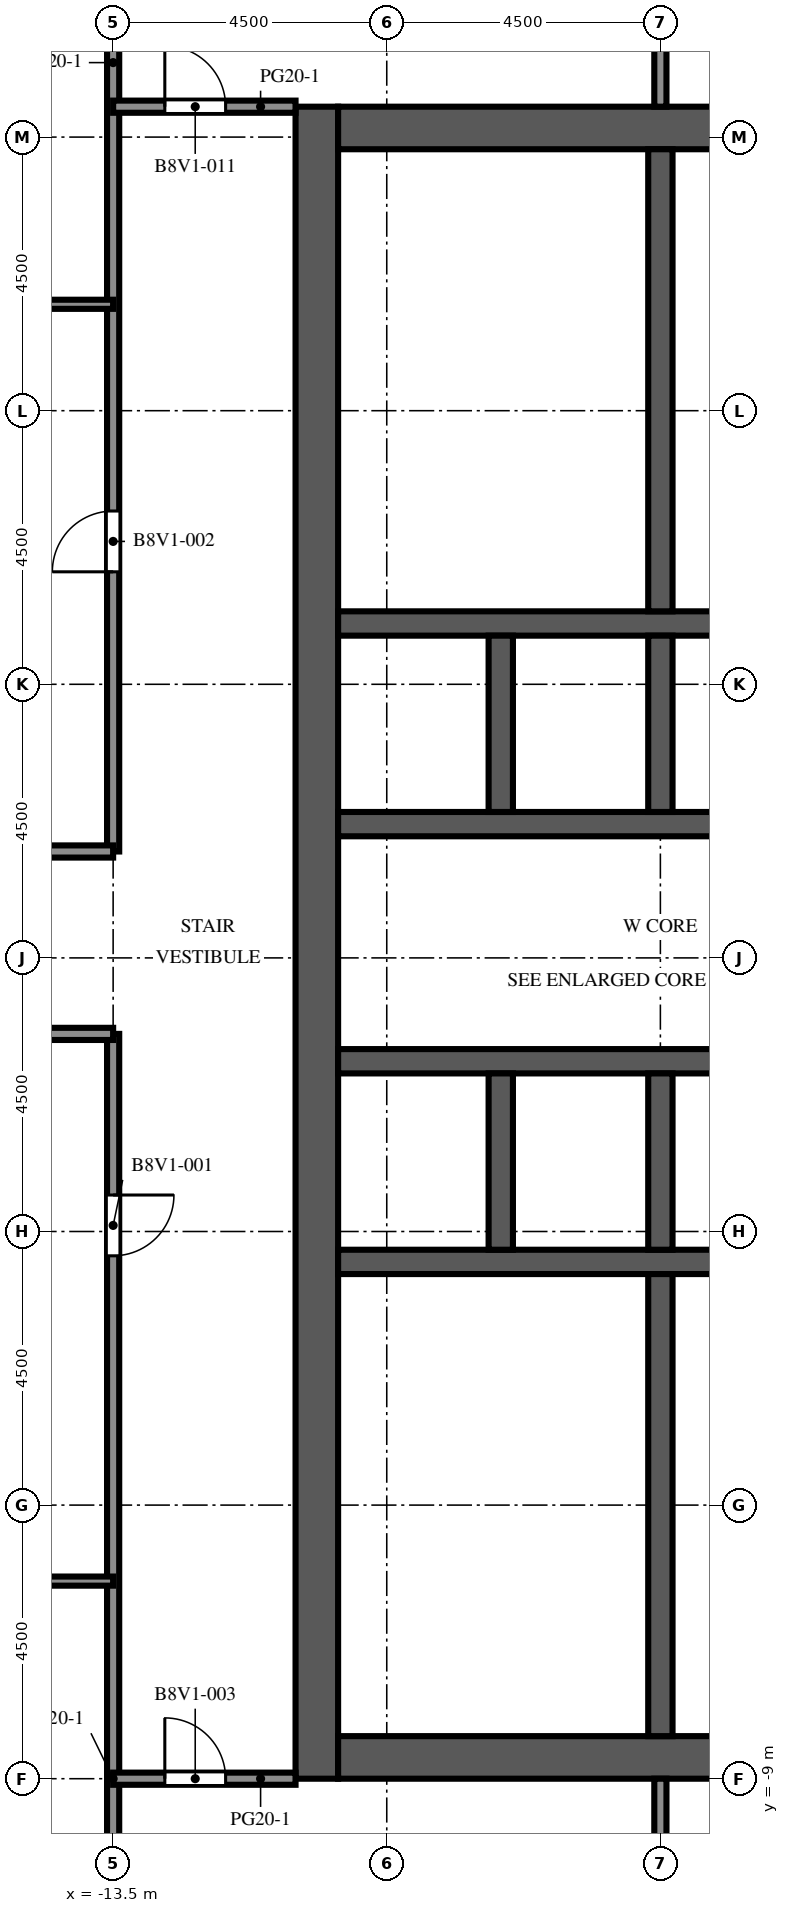
"""IFC4 building model, lengths in metres.
Left out: names, types, materials, properties, quantities, classifications, styles, units other than length and angle.
Written with IfcOpenShell. Run it as: python <this file> out.ifc"""

import sys

from ifc_helpers import new_model, si_unit, direction, frame, frame_2d, origin, place, context, subcontext, project, spatial, rectangle, extrude, element, fill, save


model = new_model("IFC4")
c1 = context("Model", 3, precision=1e-05, world=origin(), true_north=direction((0.0, 1.0)))
c2 = subcontext(c1, "Body", "Model", "MODEL_VIEW")
j1 = project(units=[si_unit("LENGTHUNIT", "METRE"), si_unit("PLANEANGLEUNIT", "RADIAN")], contexts=[c1])
p1 = place(None, origin())
s1 = spatial("IfcSite", under=j1, at=p1, CompositionType="ELEMENT")
p2 = place(p1, origin())
s2 = spatial("IfcBuilding", under=s1, at=p2, CompositionType="ELEMENT")
p3 = place(p2, frame((0.0, 0.0, 270.4)))
s3 = spatial("IfcBuildingStorey", under=s2, at=p3, CompositionType="ELEMENT", Elevation=270.4)
p4 = place(p3, frame((-10.15, -9.0, 0.0), z_axis=(0.0, 0.0, 1.0), x_axis=(0.0, 1.0, 0.0)))
e1 = element("IfcWall", 1, at=p4, inside=s3, PredefinedType="SHEAR", context=c2, shape_type="SweptSolid", body=[
    extrude(rectangle(XDim=27.5, YDim=0.7, at=frame_2d((13.75, 0.0))), origin(), (0.0, 0.0, 1.0), 4.1),
])
p5 = place(p4, frame((12.55, 0.0, 0.0)))
e2 = element("IfcOpeningElement", 2, at=p5, cuts=e1, PredefinedType="OPENING", context=c2, shape_type="SweptSolid", body=[
    extrude(rectangle(XDim=2.4, YDim=2.4, at=frame_2d((1.2, 1.2))), frame((0.0, 0.36, 0.0), z_axis=(0.0, -1.0, 0.0), x_axis=(1.0, 0.0, 0.0)), (0.0, 0.0, 1.0), 0.72),
])
p6 = place(p4, frame((6.825, 0.0, 0.0)))
e3 = element("IfcOpeningElement", 3, at=p6, cuts=e1, PredefinedType="OPENING", context=c2, shape_type="SweptSolid", body=[
    extrude(rectangle(XDim=1.2, YDim=2.1, at=frame_2d((0.6, 1.05))), frame((0.0, 0.36, 0.0), z_axis=(0.0, -1.0, 0.0), x_axis=(1.0, 0.0, 0.0)), (0.0, 0.0, 1.0), 0.72),
])
p7 = place(p4, frame((19.475, 0.0, 0.0)))
e4 = element("IfcOpeningElement", 4, at=p7, cuts=e1, PredefinedType="OPENING", context=c2, shape_type="SweptSolid", body=[
    extrude(rectangle(XDim=1.2, YDim=2.1, at=frame_2d((0.6, 1.05))), frame((0.0, 0.36, 0.0), z_axis=(0.0, -1.0, 0.0), x_axis=(1.0, 0.0, 0.0)), (0.0, 0.0, 1.0), 0.72),
])
for number, where, z_axis, x_axis in (
    (5, (-9.8, -8.65, 0.0), (0.0, 0.0, 1.0), (1.0, 0.0, 0.0)),
    (6, (-9.8, 18.15, 0.0), (0.0, 0.0, 1.0), (1.0, 0.0, 0.0)),
):
    element("IfcWall", number, at=place(p3, frame(where, z_axis=z_axis, x_axis=x_axis)), inside=s3, PredefinedType="SHEAR", context=c2, shape_type="SweptSolid", body=[
        extrude(rectangle(XDim=10.6, YDim=0.7, at=frame_2d((5.3, 0.0))), origin(), (0.0, 0.0, 1.0), 4.1),
    ])
p8 = place(p3, frame((-9.8, -0.5, 0.0), z_axis=(0.0, 0.0, 1.0), x_axis=(1.0, 0.0, 0.0)))
e7 = element("IfcWall", 7, at=p8, inside=s3, PredefinedType="SHEAR", context=c2, shape_type="SweptSolid", body=[
    extrude(rectangle(XDim=10.6, YDim=0.4, at=frame_2d((5.3, 0.0))), origin(), (0.0, 0.0, 1.0), 4.1),
])
p9 = place(p3, frame((-9.8, 2.8, 0.0), z_axis=(0.0, 0.0, 1.0), x_axis=(1.0, 0.0, 0.0)))
e8 = element("IfcWall", 8, at=p9, inside=s3, PredefinedType="SHEAR", context=c2, shape_type="SweptSolid", body=[
    extrude(rectangle(XDim=10.6, YDim=0.4, at=frame_2d((5.3, 0.0))), origin(), (0.0, 0.0, 1.0), 4.1),
])
p10 = place(p9, frame((0.688, 0.0, 0.0)))
e9 = element("IfcOpeningElement", 9, at=p10, cuts=e8, PredefinedType="OPENING", context=c2, shape_type="SweptSolid", body=[
    extrude(rectangle(XDim=1.1, YDim=2.1, at=frame_2d((0.55, 1.05))), frame((0.0, 0.21, 0.0), z_axis=(0.0, -1.0, 0.0), x_axis=(1.0, 0.0, 0.0)), (0.0, 0.0, 1.0), 0.42),
])
p11 = place(p9, frame((3.438, 0.0, 0.0)))
e10 = element("IfcOpeningElement", 10, at=p11, cuts=e8, PredefinedType="OPENING", context=c2, shape_type="SweptSolid", body=[
    extrude(rectangle(XDim=1.1, YDim=2.1, at=frame_2d((0.55, 1.05))), frame((0.0, 0.21, 0.0), z_axis=(0.0, -1.0, 0.0), x_axis=(1.0, 0.0, 0.0)), (0.0, 0.0, 1.0), 0.42),
])
p12 = place(p9, frame((6.113, 0.0, 0.0)))
e11 = element("IfcOpeningElement", 11, at=p12, cuts=e8, PredefinedType="OPENING", context=c2, shape_type="SweptSolid", body=[
    extrude(rectangle(XDim=1.0, YDim=2.1, at=frame_2d((0.5, 1.05))), frame((0.0, 0.21, 0.0), z_axis=(0.0, -1.0, 0.0), x_axis=(1.0, 0.0, 0.0)), (0.0, 0.0, 1.0), 0.42),
])
p13 = place(p9, frame((8.863, 0.0, 0.0)))
e12 = element("IfcOpeningElement", 12, at=p13, cuts=e8, PredefinedType="OPENING", context=c2, shape_type="SweptSolid", body=[
    extrude(rectangle(XDim=1.0, YDim=2.1, at=frame_2d((0.5, 1.05))), frame((0.0, 0.21, 0.0), z_axis=(0.0, -1.0, 0.0), x_axis=(1.0, 0.0, 0.0)), (0.0, 0.0, 1.0), 0.42),
])
p14 = place(p3, frame((-9.8, 6.7, 0.0), z_axis=(0.0, 0.0, 1.0), x_axis=(1.0, 0.0, 0.0)))
e13 = element("IfcWall", 13, at=p14, inside=s3, PredefinedType="SHEAR", context=c2, shape_type="SweptSolid", body=[
    extrude(rectangle(XDim=10.6, YDim=0.4, at=frame_2d((5.3, 0.0))), origin(), (0.0, 0.0, 1.0), 4.1),
])
p15 = place(p14, frame((3.438, 0.0, 0.0)))
e14 = element("IfcOpeningElement", 14, at=p15, cuts=e13, PredefinedType="OPENING", context=c2, shape_type="SweptSolid", body=[
    extrude(rectangle(XDim=1.1, YDim=2.1, at=frame_2d((0.55, 1.05))), frame((0.0, 0.21, 0.0), z_axis=(0.0, -1.0, 0.0), x_axis=(1.0, 0.0, 0.0)), (0.0, 0.0, 1.0), 0.42),
])
p16 = place(p14, frame((6.062, 0.0, 0.0)))
e15 = element("IfcOpeningElement", 15, at=p16, cuts=e13, PredefinedType="OPENING", context=c2, shape_type="SweptSolid", body=[
    extrude(rectangle(XDim=1.1, YDim=2.1, at=frame_2d((0.55, 1.05))), frame((0.0, 0.21, 0.0), z_axis=(0.0, -1.0, 0.0), x_axis=(1.0, 0.0, 0.0)), (0.0, 0.0, 1.0), 0.42),
])
p17 = place(p14, frame((8.812, 0.0, 0.0)))
e16 = element("IfcOpeningElement", 16, at=p17, cuts=e13, PredefinedType="OPENING", context=c2, shape_type="SweptSolid", body=[
    extrude(rectangle(XDim=1.1, YDim=2.1, at=frame_2d((0.55, 1.05))), frame((0.0, 0.21, 0.0), z_axis=(0.0, -1.0, 0.0), x_axis=(1.0, 0.0, 0.0)), (0.0, 0.0, 1.0), 0.42),
])
p18 = place(p14, frame((0.738, 0.0, 0.0)))
e17 = element("IfcOpeningElement", 17, at=p18, cuts=e13, PredefinedType="OPENING", context=c2, shape_type="SweptSolid", body=[
    extrude(rectangle(XDim=1.0, YDim=2.1, at=frame_2d((0.5, 1.05))), frame((0.0, 0.21, 0.0), z_axis=(0.0, -1.0, 0.0), x_axis=(1.0, 0.0, 0.0)), (0.0, 0.0, 1.0), 0.42),
])
p19 = place(p3, frame((-9.8, 10.0, 0.0), z_axis=(0.0, 0.0, 1.0), x_axis=(1.0, 0.0, 0.0)))
e18 = element("IfcWall", 18, at=p19, inside=s3, PredefinedType="SHEAR", context=c2, shape_type="SweptSolid", body=[
    extrude(rectangle(XDim=10.6, YDim=0.4, at=frame_2d((5.3, 0.0))), origin(), (0.0, 0.0, 1.0), 4.1),
])
for number, where, z_axis, x_axis in (
    (19, (-7.125, -0.3, 0.0), (0.0, 0.0, 1.0), (0.0, 1.0, 0.0)),
    (20, (-7.125, 6.9, 0.0), (0.0, 0.0, 1.0), (0.0, 1.0, 0.0)),
    (21, (-4.5, -0.3, 0.0), (0.0, 0.0, 1.0), (0.0, 1.0, 0.0)),
    (22, (-4.5, 6.9, 0.0), (0.0, 0.0, 1.0), (0.0, 1.0, 0.0)),
):
    element("IfcWall", number, at=place(p3, frame(where, z_axis=z_axis, x_axis=x_axis)), inside=s3, PredefinedType="SHEAR", context=c2, shape_type="SweptSolid", body=[
        extrude(rectangle(XDim=2.9, YDim=0.4, at=frame_2d((1.45, 0.0))), origin(), (0.0, 0.0, 1.0), 4.1),
    ])
for number, where, z_axis, x_axis in (
    (23, (-4.5, -8.3, 0.0), (0.0, 0.0, 1.0), (0.0, 1.0, 0.0)),
    (24, (-4.5, 10.2, 0.0), (0.0, 0.0, 1.0), (0.0, 1.0, 0.0)),
):
    element("IfcWall", number, at=place(p3, frame(where, z_axis=z_axis, x_axis=x_axis)), inside=s3, PredefinedType="SHEAR", context=c2, shape_type="SweptSolid", body=[
        extrude(rectangle(XDim=7.6, YDim=0.4, at=frame_2d((3.8, 0.0))), origin(), (0.0, 0.0, 1.0), 4.1),
    ])
for number, where, z_axis, x_axis in (
    (25, (-4.3, -6.02, 0.0), (0.0, 0.0, 1.0), (1.0, 0.0, 0.0)),
    (26, (-4.3, -2.98, 0.0), (0.0, 0.0, 1.0), (1.0, 0.0, 0.0)),
):
    element("IfcWall", number, at=place(p3, frame(where, z_axis=z_axis, x_axis=x_axis)), inside=s3, PredefinedType="PARTITIONING", context=c2, shape_type="SweptSolid", body=[
        extrude(rectangle(XDim=3.5, YDim=0.1, at=frame_2d((1.75, 0.0))), origin(), (0.0, 0.0, 1.0), 3.65),
    ])
for number, where, z_axis, x_axis in (
    (27, (-4.3, 11.72, 0.0), (0.0, 0.0, 1.0), (1.0, 0.0, 0.0)),
    (28, (-4.3, 13.62, 0.0), (0.0, 0.0, 1.0), (1.0, 0.0, 0.0)),
    (29, (-4.3, 15.9, 0.0), (0.0, 0.0, 1.0), (1.0, 0.0, 0.0)),
):
    element("IfcWall", number, at=place(p3, frame(where, z_axis=z_axis, x_axis=x_axis)), inside=s3, PredefinedType="PARTITIONING", context=c2, shape_type="SweptSolid", body=[
        extrude(rectangle(XDim=5.1, YDim=0.1, at=frame_2d((2.55, 0.0))), origin(), (0.0, 0.0, 1.0), 3.65),
    ])
p20 = place(p3, frame((-13.5, -17.6, 0.0), z_axis=(0.0, 0.0, 1.0), x_axis=(0.0, 1.0, 0.0)))
e30 = element("IfcWall", 30, at=p20, inside=s3, PredefinedType="PARTITIONING", context=c2, shape_type="SweptSolid", body=[
    extrude(rectangle(XDim=20.85, YDim=0.2, at=frame_2d((10.425, 0.0))), origin(), (0.0, 0.0, 1.0), 3.65),
])
p21 = place(p20, frame((17.2, 0.0, 0.0)))
e31 = element("IfcOpeningElement", 31, at=p21, cuts=e30, PredefinedType="OPENING", context=c2, shape_type="SweptSolid", body=[
    extrude(rectangle(XDim=1.0, YDim=2.1, at=frame_2d((0.5, 1.05))), frame((0.0, 0.11, 0.0), z_axis=(0.0, -1.0, 0.0), x_axis=(1.0, 0.0, 0.0)), (0.0, 0.0, 1.0), 0.22),
])
p22 = place(p3, frame((-13.5, 6.25, 0.0), z_axis=(0.0, 0.0, 1.0), x_axis=(0.0, 1.0, 0.0)))
e32 = element("IfcWall", 32, at=p22, inside=s3, PredefinedType="PARTITIONING", context=c2, shape_type="SweptSolid", body=[
    extrude(rectangle(XDim=20.35, YDim=0.2, at=frame_2d((10.175, 0.0))), origin(), (0.0, 0.0, 1.0), 3.65),
])
p23 = place(p22, frame((4.6, 0.0, 0.0)))
e33 = element("IfcOpeningElement", 33, at=p23, cuts=e32, PredefinedType="OPENING", context=c2, shape_type="SweptSolid", body=[
    extrude(rectangle(XDim=1.0, YDim=2.1, at=frame_2d((0.5, 1.05))), frame((0.0, 0.11, 0.0), z_axis=(0.0, -1.0, 0.0), x_axis=(1.0, 0.0, 0.0)), (0.0, 0.0, 1.0), 0.22),
])
p24 = place(p3, frame((-4.5, -17.6, 0.0), z_axis=(0.0, 0.0, 1.0), x_axis=(0.0, 1.0, 0.0)))
e34 = element("IfcWall", 34, at=p24, inside=s3, PredefinedType="PARTITIONING", context=c2, shape_type="SweptSolid", body=[
    extrude(rectangle(XDim=8.6, YDim=0.2, at=frame_2d((4.3, 0.0))), origin(), (0.0, 0.0, 1.0), 3.65),
])
p25 = place(p3, frame((-4.5, 18.5, 0.0), z_axis=(0.0, 0.0, 1.0), x_axis=(0.0, 1.0, 0.0)))
e35 = element("IfcWall", 35, at=p25, inside=s3, PredefinedType="PARTITIONING", context=c2, shape_type="SweptSolid", body=[
    extrude(rectangle(XDim=8.1, YDim=0.2, at=frame_2d((4.05, 0.0))), origin(), (0.0, 0.0, 1.0), 3.65),
])
p26 = place(p3, frame((-10.5, -9.0, 0.0), z_axis=(0.0, 0.0, 1.0), x_axis=(-1.0, 0.0, 0.0)))
e36 = element("IfcWall", 36, at=p26, inside=s3, PredefinedType="PARTITIONING", context=c2, shape_type="SweptSolid", body=[
    extrude(rectangle(XDim=3.0, YDim=0.2, at=frame_2d((1.5, 0.0))), origin(), (0.0, 0.0, 1.0), 3.65),
])
p27 = place(p26, frame((1.15, 0.0, 0.0)))
e37 = element("IfcOpeningElement", 37, at=p27, cuts=e36, PredefinedType="OPENING", context=c2, shape_type="SweptSolid", body=[
    extrude(rectangle(XDim=1.0, YDim=2.1, at=frame_2d((0.5, 1.05))), frame((0.0, 0.11, 0.0), z_axis=(0.0, -1.0, 0.0), x_axis=(1.0, 0.0, 0.0)), (0.0, 0.0, 1.0), 0.22),
])
p28 = place(p3, frame((-13.5, -5.75, 0.0), z_axis=(0.0, 0.0, 1.0), x_axis=(-1.0, 0.0, 0.0)))
e38 = element("IfcWall", 38, at=p28, inside=s3, PredefinedType="PARTITIONING", context=c2, shape_type="SweptSolid", body=[
    extrude(rectangle(XDim=8.85, YDim=0.15, at=frame_2d((4.425, 0.0))), origin(), (0.0, 0.0, 1.0), 3.65),
])
p29 = place(p28, frame((4.15, 0.0, 0.0)))
e39 = element("IfcOpeningElement", 39, at=p29, cuts=e38, PredefinedType="OPENING", context=c2, shape_type="SweptSolid", body=[
    extrude(rectangle(XDim=1.0, YDim=2.1, at=frame_2d((0.5, 1.05))), frame((0.0, 0.085, 0.0), z_axis=(0.0, -1.0, 0.0), x_axis=(1.0, 0.0, 0.0)), (0.0, 0.0, 1.0), 0.17),
])
for number, where, z_axis, x_axis in (
    (40, (-22.35, 3.25, 0.0), (0.0, 0.0, 1.0), (1.0, 0.0, 0.0)),
    (41, (-22.35, 6.25, 0.0), (0.0, 0.0, 1.0), (1.0, 0.0, 0.0)),
):
    element("IfcWall", number, at=place(p3, frame(where, z_axis=z_axis, x_axis=x_axis)), inside=s3, PredefinedType="PARTITIONING", context=c2, shape_type="SweptSolid", body=[
        extrude(rectangle(XDim=8.85, YDim=0.2, at=frame_2d((4.425, 0.0))), origin(), (0.0, 0.0, 1.0), 3.65),
    ])
p30 = place(p3, frame((-22.35, 15.25, 0.0), z_axis=(0.0, 0.0, 1.0), x_axis=(1.0, 0.0, 0.0)))
e42 = element("IfcWall", 42, at=p30, inside=s3, PredefinedType="PARTITIONING", context=c2, shape_type="SweptSolid", body=[
    extrude(rectangle(XDim=8.85, YDim=0.15, at=frame_2d((4.425, 0.0))), origin(), (0.0, 0.0, 1.0), 3.65),
])
p31 = place(p30, frame((2.7, 0.0, 0.0)))
e43 = element("IfcOpeningElement", 43, at=p31, cuts=e42, PredefinedType="OPENING", context=c2, shape_type="SweptSolid", body=[
    extrude(rectangle(XDim=1.0, YDim=2.1, at=frame_2d((0.5, 1.05))), frame((0.0, 0.085, 0.0), z_axis=(0.0, -1.0, 0.0), x_axis=(1.0, 0.0, 0.0)), (0.0, 0.0, 1.0), 0.17),
])
p32 = place(p3, frame((-13.5, 18.5, 0.0), z_axis=(0.0, 0.0, 1.0), x_axis=(1.0, 0.0, 0.0)))
e44 = element("IfcWall", 44, at=p32, inside=s3, PredefinedType="PARTITIONING", context=c2, shape_type="SweptSolid", body=[
    extrude(rectangle(XDim=3.0, YDim=0.2, at=frame_2d((1.5, 0.0))), origin(), (0.0, 0.0, 1.0), 3.65),
])
p33 = place(p32, frame((0.85, 0.0, 0.0)))
e45 = element("IfcOpeningElement", 45, at=p33, cuts=e44, PredefinedType="OPENING", context=c2, shape_type="SweptSolid", body=[
    extrude(rectangle(XDim=1.0, YDim=2.1, at=frame_2d((0.5, 1.05))), frame((0.0, 0.11, 0.0), z_axis=(0.0, -1.0, 0.0), x_axis=(1.0, 0.0, 0.0)), (0.0, 0.0, 1.0), 0.22),
])
p34 = place(p10, origin())
e46 = element("IfcDoor", 46, at=p34, inside=s3, OperationType="DOUBLE_DOOR_SLIDING", PredefinedType="DOOR", context=c2, shape_type="SweptSolid", body=[
    extrude(rectangle(XDim=1.1, YDim=2.1, at=frame_2d((0.55, 1.05))), frame((0.0, 0.025, 0.0), z_axis=(0.0, -1.0, 0.0), x_axis=(1.0, 0.0, 0.0)), (0.0, 0.0, 1.0), 0.05),
])
fill(e9, e46)
p35 = place(p11, origin())
e47 = element("IfcDoor", 47, at=p35, inside=s3, OperationType="DOUBLE_DOOR_SLIDING", PredefinedType="DOOR", context=c2, shape_type="SweptSolid", body=[
    extrude(rectangle(XDim=1.1, YDim=2.1, at=frame_2d((0.55, 1.05))), frame((0.0, 0.025, 0.0), z_axis=(0.0, -1.0, 0.0), x_axis=(1.0, 0.0, 0.0)), (0.0, 0.0, 1.0), 0.05),
])
fill(e10, e47)
p36 = place(p15, origin())
e48 = element("IfcDoor", 48, at=p36, inside=s3, OperationType="DOUBLE_DOOR_SLIDING", PredefinedType="DOOR", context=c2, shape_type="SweptSolid", body=[
    extrude(rectangle(XDim=1.1, YDim=2.1, at=frame_2d((0.55, 1.05))), frame((0.0, 0.025, 0.0), z_axis=(0.0, -1.0, 0.0), x_axis=(1.0, 0.0, 0.0)), (0.0, 0.0, 1.0), 0.05),
])
fill(e14, e48)
p37 = place(p16, origin())
e49 = element("IfcDoor", 49, at=p37, inside=s3, OperationType="DOUBLE_DOOR_SLIDING", PredefinedType="DOOR", context=c2, shape_type="SweptSolid", body=[
    extrude(rectangle(XDim=1.1, YDim=2.1, at=frame_2d((0.55, 1.05))), frame((0.0, 0.025, 0.0), z_axis=(0.0, -1.0, 0.0), x_axis=(1.0, 0.0, 0.0)), (0.0, 0.0, 1.0), 0.05),
])
fill(e15, e49)
p38 = place(p5, origin())
e50 = element("IfcDoor", 50, at=p38, inside=s3, OperationType="DOUBLE_DOOR_DOUBLE_SWING", PredefinedType="DOOR", context=c2, shape_type="SweptSolid", body=[
    extrude(rectangle(XDim=2.4, YDim=2.4, at=frame_2d((1.2, 1.2))), frame((0.0, 0.025, 0.0), z_axis=(0.0, -1.0, 0.0), x_axis=(1.0, 0.0, 0.0)), (0.0, 0.0, 1.0), 0.05),
])
fill(e2, e50)
p39 = place(p6, origin())
e51 = element("IfcDoor", 51, at=p39, inside=s3, OperationType="SINGLE_SWING_LEFT", PredefinedType="DOOR", context=c2, shape_type="SweptSolid", body=[
    extrude(rectangle(XDim=1.2, YDim=2.1, at=frame_2d((0.6, 1.05))), frame((0.0, 0.025, 0.0), z_axis=(0.0, -1.0, 0.0), x_axis=(1.0, 0.0, 0.0)), (0.0, 0.0, 1.0), 0.05),
])
fill(e3, e51)
p40 = place(p7, origin())
e52 = element("IfcDoor", 52, at=p40, inside=s3, OperationType="SINGLE_SWING_LEFT", PredefinedType="DOOR", context=c2, shape_type="SweptSolid", body=[
    extrude(rectangle(XDim=1.2, YDim=2.1, at=frame_2d((0.6, 1.05))), frame((0.0, 0.025, 0.0), z_axis=(0.0, -1.0, 0.0), x_axis=(1.0, 0.0, 0.0)), (0.0, 0.0, 1.0), 0.05),
])
fill(e4, e52)
p41 = place(p18, origin())
e53 = element("IfcDoor", 53, at=p41, inside=s3, OperationType="SINGLE_SWING_LEFT", PredefinedType="DOOR", context=c2, shape_type="SweptSolid", body=[
    extrude(rectangle(XDim=1.0, YDim=2.1, at=frame_2d((0.5, 1.05))), frame((0.0, 0.025, 0.0), z_axis=(0.0, -1.0, 0.0), x_axis=(1.0, 0.0, 0.0)), (0.0, 0.0, 1.0), 0.05),
])
fill(e17, e53)
p42 = place(p21, origin())
e54 = element("IfcDoor", 54, at=p42, inside=s3, OperationType="SINGLE_SWING_RIGHT", PredefinedType="DOOR", context=c2, shape_type="SweptSolid", body=[
    extrude(rectangle(XDim=1.0, YDim=2.1, at=frame_2d((0.5, 1.05))), frame((0.0, 0.025, 0.0), z_axis=(0.0, -1.0, 0.0), x_axis=(1.0, 0.0, 0.0)), (0.0, 0.0, 1.0), 0.05),
])
fill(e31, e54)
p43 = place(p23, origin())
e55 = element("IfcDoor", 55, at=p43, inside=s3, OperationType="SINGLE_SWING_LEFT", PredefinedType="DOOR", context=c2, shape_type="SweptSolid", body=[
    extrude(rectangle(XDim=1.0, YDim=2.1, at=frame_2d((0.5, 1.05))), frame((0.0, 0.025, 0.0), z_axis=(0.0, -1.0, 0.0), x_axis=(1.0, 0.0, 0.0)), (0.0, 0.0, 1.0), 0.05),
])
fill(e33, e55)
p44 = place(p27, origin())
e56 = element("IfcDoor", 56, at=p44, inside=s3, OperationType="SINGLE_SWING_RIGHT", PredefinedType="DOOR", context=c2, shape_type="SweptSolid", body=[
    extrude(rectangle(XDim=1.0, YDim=2.1, at=frame_2d((0.5, 1.05))), frame((0.0, 0.025, 0.0), z_axis=(0.0, -1.0, 0.0), x_axis=(1.0, 0.0, 0.0)), (0.0, 0.0, 1.0), 0.05),
])
fill(e37, e56)
p45 = place(p33, origin())
e57 = element("IfcDoor", 57, at=p45, inside=s3, OperationType="SINGLE_SWING_LEFT", PredefinedType="DOOR", context=c2, shape_type="SweptSolid", body=[
    extrude(rectangle(XDim=1.0, YDim=2.1, at=frame_2d((0.5, 1.05))), frame((0.0, 0.025, 0.0), z_axis=(0.0, -1.0, 0.0), x_axis=(1.0, 0.0, 0.0)), (0.0, 0.0, 1.0), 0.05),
])
fill(e45, e57)
save(model, sys.argv[1])
